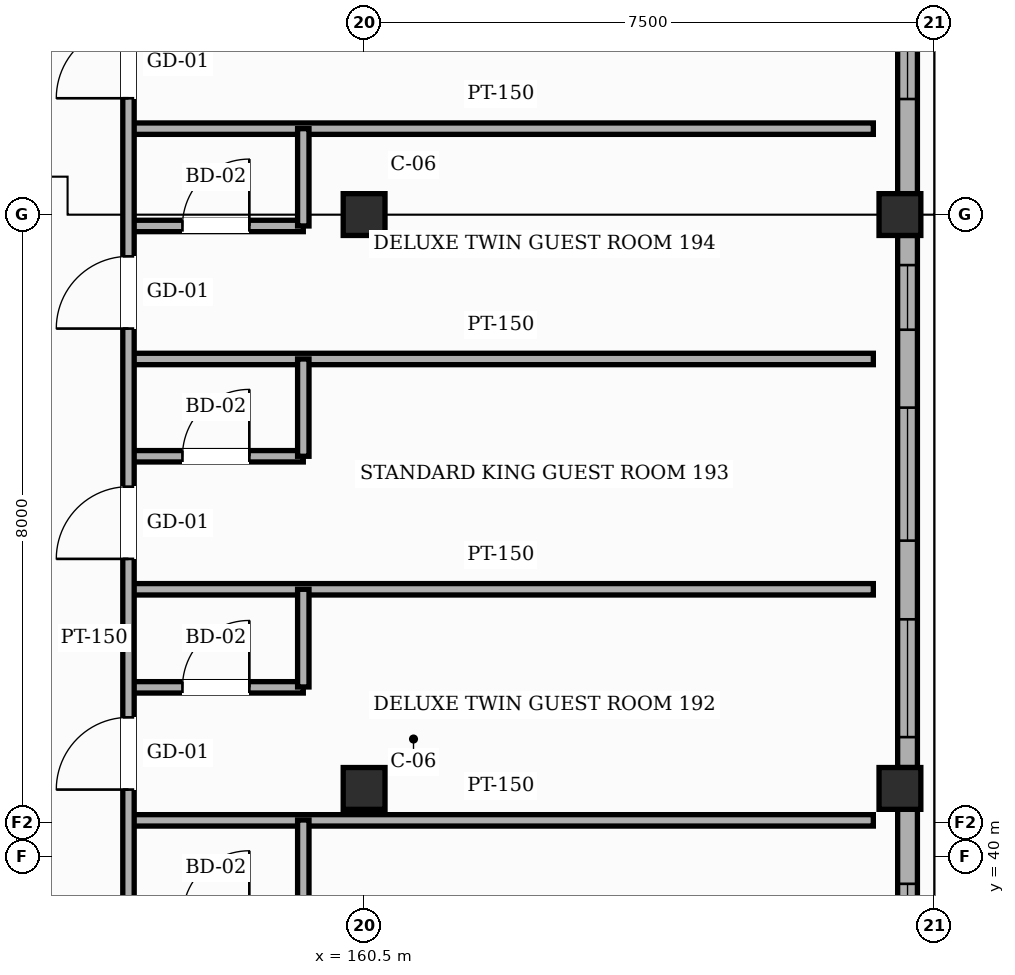
"""IFC4 building model, lengths in metres.
Left out: names, types, materials, properties, quantities, classifications, styles, units other than length and angle.
Written with IfcOpenShell. Run it as: python <this file> out.ifc"""

import sys

from ifc_helpers import new_model, si_unit, direction, frame, frame_2d, origin, origin_2d, place, context, subcontext, project, spatial, rectangle, hollow_rectangle, extrude, element, fill, save


model = new_model("IFC4")
c1 = context("Model", 3, precision=1e-05, world=origin(), true_north=direction((0.0, 1.0)))
c2 = subcontext(c1, "Body", "Model", "MODEL_VIEW")
j1 = project(units=[si_unit("LENGTHUNIT", "METRE"), si_unit("PLANEANGLEUNIT", "RADIAN")], contexts=[c1])
p1 = place(None, origin())
s1 = spatial("IfcSite", under=j1, at=p1, CompositionType="ELEMENT")
p2 = place(p1, origin())
s2 = spatial("IfcBuilding", under=s1, at=p2, CompositionType="ELEMENT")
p3 = place(p2, frame((0.0, 0.0, 31.8)))
s3 = spatial("IfcBuildingStorey", under=s2, at=p3, CompositionType="ELEMENT", Elevation=31.8)
for number, where, z_axis, x_axis in (
    (1, (160.5, 40.9, 0.0), (0.0, 0.0, 1.0), (1.0, 0.0, 0.0)),
    (2, (160.5, 48.45, 0.0), (0.0, 0.0, 1.0), (1.0, 0.0, 0.0)),
    (3, (167.55, 40.9, 0.0), (0.0, 0.0, 1.0), (1.0, 0.0, 0.0)),
    (4, (167.55, 48.45, 0.0), (0.0, 0.0, 1.0), (1.0, 0.0, 0.0)),
):
    element("IfcColumn", number, at=place(p3, frame(where, z_axis=z_axis, x_axis=x_axis)), inside=s3, PredefinedType="COLUMN", context=c2, shape_type="SweptSolid", body=[
        extrude(hollow_rectangle(XDim=0.55, YDim=0.55, WallThickness=0.022, InnerFilletRadius=0.022, OuterFilletRadius=0.044, at=origin_2d()), origin(), (0.0, 0.0, 1.0), 3.6),
    ])
p4 = place(p3, frame((167.65, 40.625, 0.0), z_axis=(0.0, 0.0, 1.0), x_axis=(0.0, -1.0, 0.0)))
e5 = element("IfcWall", 5, at=p4, inside=s3, PredefinedType="SOLIDWALL", context=c2, shape_type="SweptSolid", body=[
    extrude(rectangle(XDim=8.35, YDim=0.26, at=frame_2d((4.175, 0.0))), origin(), (0.0, 0.0, 1.0), 2.755),
])
p5 = place(p4, frame((6.85, 0.0, 0.85)))
e6 = element("IfcOpeningElement", 6, at=p5, cuts=e5, PredefinedType="OPENING", context=c2, shape_type="SweptSolid", body=[
    extrude(rectangle(XDim=0.85, YDim=1.35, at=frame_2d((0.425, 0.675))), frame((0.0, 0.14, 0.0), z_axis=(0.0, -1.0, 0.0), x_axis=(1.0, 0.0, 0.0)), (0.0, 0.0, 1.0), 0.28),
])
p6 = place(p4, frame((4.11, 0.0, 0.85)))
e7 = element("IfcOpeningElement", 7, at=p6, cuts=e5, PredefinedType="OPENING", context=c2, shape_type="SweptSolid", body=[
    extrude(rectangle(XDim=1.15, YDim=1.65, at=frame_2d((0.575, 0.825))), frame((0.0, 0.14, 0.0), z_axis=(0.0, -1.0, 0.0), x_axis=(1.0, 0.0, 0.0)), (0.0, 0.0, 1.0), 0.28),
])
p7 = place(p4, frame((0.98, 0.0, 0.85)))
e8 = element("IfcOpeningElement", 8, at=p7, cuts=e5, PredefinedType="OPENING", context=c2, shape_type="SweptSolid", body=[
    extrude(rectangle(XDim=1.35, YDim=1.65, at=frame_2d((0.675, 0.825))), frame((0.0, 0.14, 0.0), z_axis=(0.0, -1.0, 0.0), x_axis=(1.0, 0.0, 0.0)), (0.0, 0.0, 1.0), 0.28),
])
p8 = place(p3, frame((167.65, 48.175, 0.0), z_axis=(0.0, 0.0, 1.0), x_axis=(0.0, -1.0, 0.0)))
e9 = element("IfcWall", 9, at=p8, inside=s3, PredefinedType="SOLIDWALL", context=c2, shape_type="SweptSolid", body=[
    extrude(rectangle(XDim=7.0, YDim=0.26, at=frame_2d((3.5, 0.0))), origin(), (0.0, 0.0, 1.0), 2.755),
])
p9 = place(p8, frame((5.05, 0.0, 0.85)))
e10 = element("IfcOpeningElement", 10, at=p9, cuts=e9, PredefinedType="OPENING", context=c2, shape_type="SweptSolid", body=[
    extrude(rectangle(XDim=1.55, YDim=1.65, at=frame_2d((0.775, 0.825))), frame((0.0, 0.14, 0.0), z_axis=(0.0, -1.0, 0.0), x_axis=(1.0, 0.0, 0.0)), (0.0, 0.0, 1.0), 0.28),
])
p10 = place(p8, frame((2.265, 0.0, 0.85)))
e11 = element("IfcOpeningElement", 11, at=p10, cuts=e9, PredefinedType="OPENING", context=c2, shape_type="SweptSolid", body=[
    extrude(rectangle(XDim=1.75, YDim=1.65, at=frame_2d((0.875, 0.825))), frame((0.0, 0.14, 0.0), z_axis=(0.0, -1.0, 0.0), x_axis=(1.0, 0.0, 0.0)), (0.0, 0.0, 1.0), 0.28),
])
p11 = place(p8, frame((0.39, 0.0, 0.85)))
e12 = element("IfcOpeningElement", 12, at=p11, cuts=e9, PredefinedType="OPENING", context=c2, shape_type="SweptSolid", body=[
    extrude(rectangle(XDim=0.85, YDim=1.35, at=frame_2d((0.425, 0.675))), frame((0.0, 0.14, 0.0), z_axis=(0.0, -1.0, 0.0), x_axis=(1.0, 0.0, 0.0)), (0.0, 0.0, 1.0), 0.28),
])
p12 = place(p3, frame((167.65, 56.175, 0.0), z_axis=(0.0, 0.0, 1.0), x_axis=(0.0, -1.0, 0.0)))
e13 = element("IfcWall", 13, at=p12, inside=s3, PredefinedType="SOLIDWALL", context=c2, shape_type="SweptSolid", body=[
    extrude(rectangle(XDim=7.45, YDim=0.26, at=frame_2d((3.725, 0.0))), origin(), (0.0, 0.0, 1.0), 2.755),
])
p13 = place(p12, frame((3.955, 0.0, 0.85)))
e14 = element("IfcOpeningElement", 14, at=p13, cuts=e13, PredefinedType="OPENING", context=c2, shape_type="SweptSolid", body=[
    extrude(rectangle(XDim=2.25, YDim=1.65, at=frame_2d((1.125, 0.825))), frame((0.0, 0.14, 0.0), z_axis=(0.0, -1.0, 0.0), x_axis=(1.0, 0.0, 0.0)), (0.0, 0.0, 1.0), 0.28),
])
p14 = place(p12, frame((1.37, 0.0, 0.85)))
e15 = element("IfcOpeningElement", 15, at=p14, cuts=e13, PredefinedType="OPENING", context=c2, shape_type="SweptSolid", body=[
    extrude(rectangle(XDim=1.35, YDim=1.35, at=frame_2d((0.675, 0.675))), frame((0.0, 0.14, 0.0), z_axis=(0.0, -1.0, 0.0), x_axis=(1.0, 0.0, 0.0)), (0.0, 0.0, 1.0), 0.28),
])
p15 = place(p3, frame((157.4, 40.48, 0.0), z_axis=(0.0, 0.0, 1.0), x_axis=(1.0, 0.0, 0.0)))
e16 = element("IfcWall", 16, at=p15, inside=s3, PredefinedType="PARTITIONING", context=c2, shape_type="SweptSolid", body=[
    extrude(rectangle(XDim=9.8, YDim=0.15, at=frame_2d((4.9, 0.0))), origin(), (0.0, 0.0, 1.0), 3.365),
])
p16 = place(p3, frame((157.4, 42.23, 0.0), z_axis=(0.0, 0.0, 1.0), x_axis=(1.0, 0.0, 0.0)))
e17 = element("IfcWall", 17, at=p16, inside=s3, PredefinedType="PARTITIONING", context=c2, shape_type="SweptSolid", body=[
    extrude(rectangle(XDim=2.3, YDim=0.15, at=frame_2d((1.15, 0.0))), origin(), (0.0, 0.0, 1.0), 3.365),
])
p17 = place(p16, frame((0.71, 0.0, 0.0)))
e18 = element("IfcOpeningElement", 18, at=p17, cuts=e17, PredefinedType="OPENING", context=c2, shape_type="SweptSolid", body=[
    extrude(rectangle(XDim=0.88, YDim=2.12, at=frame_2d((0.44, 1.06))), frame((0.0, 0.085, 0.0), z_axis=(0.0, -1.0, 0.0), x_axis=(1.0, 0.0, 0.0)), (0.0, 0.0, 1.0), 0.17),
])
p18 = place(p3, frame((157.4, 43.52, 0.0), z_axis=(0.0, 0.0, 1.0), x_axis=(1.0, 0.0, 0.0)))
e19 = element("IfcWall", 19, at=p18, inside=s3, PredefinedType="PARTITIONING", context=c2, shape_type="SweptSolid", body=[
    extrude(rectangle(XDim=9.8, YDim=0.15, at=frame_2d((4.9, 0.0))), origin(), (0.0, 0.0, 1.0), 3.365),
])
p19 = place(p3, frame((157.4, 45.27, 0.0), z_axis=(0.0, 0.0, 1.0), x_axis=(1.0, 0.0, 0.0)))
e20 = element("IfcWall", 20, at=p19, inside=s3, PredefinedType="PARTITIONING", context=c2, shape_type="SweptSolid", body=[
    extrude(rectangle(XDim=2.3, YDim=0.15, at=frame_2d((1.15, 0.0))), origin(), (0.0, 0.0, 1.0), 3.365),
])
p20 = place(p19, frame((0.71, 0.0, 0.0)))
e21 = element("IfcOpeningElement", 21, at=p20, cuts=e20, PredefinedType="OPENING", context=c2, shape_type="SweptSolid", body=[
    extrude(rectangle(XDim=0.88, YDim=2.12, at=frame_2d((0.44, 1.06))), frame((0.0, 0.085, 0.0), z_axis=(0.0, -1.0, 0.0), x_axis=(1.0, 0.0, 0.0)), (0.0, 0.0, 1.0), 0.17),
])
p21 = place(p3, frame((157.4, 46.55, 0.0), z_axis=(0.0, 0.0, 1.0), x_axis=(1.0, 0.0, 0.0)))
e22 = element("IfcWall", 22, at=p21, inside=s3, PredefinedType="PARTITIONING", context=c2, shape_type="SweptSolid", body=[
    extrude(rectangle(XDim=9.8, YDim=0.15, at=frame_2d((4.9, 0.0))), origin(), (0.0, 0.0, 1.0), 3.365),
])
p22 = place(p3, frame((157.4, 48.3, 0.0), z_axis=(0.0, 0.0, 1.0), x_axis=(1.0, 0.0, 0.0)))
e23 = element("IfcWall", 23, at=p22, inside=s3, PredefinedType="PARTITIONING", context=c2, shape_type="SweptSolid", body=[
    extrude(rectangle(XDim=2.3, YDim=0.15, at=frame_2d((1.15, 0.0))), origin(), (0.0, 0.0, 1.0), 3.365),
])
p23 = place(p22, frame((0.71, 0.0, 0.0)))
e24 = element("IfcOpeningElement", 24, at=p23, cuts=e23, PredefinedType="OPENING", context=c2, shape_type="SweptSolid", body=[
    extrude(rectangle(XDim=0.88, YDim=2.12, at=frame_2d((0.44, 1.06))), frame((0.0, 0.085, 0.0), z_axis=(0.0, -1.0, 0.0), x_axis=(1.0, 0.0, 0.0)), (0.0, 0.0, 1.0), 0.17),
])
p24 = place(p3, frame((157.4, 49.58, 0.0), z_axis=(0.0, 0.0, 1.0), x_axis=(1.0, 0.0, 0.0)))
e25 = element("IfcWall", 25, at=p24, inside=s3, PredefinedType="PARTITIONING", context=c2, shape_type="SweptSolid", body=[
    extrude(rectangle(XDim=9.8, YDim=0.15, at=frame_2d((4.9, 0.0))), origin(), (0.0, 0.0, 1.0), 3.365),
])
p25 = place(p3, frame((157.4, 22.3, 0.0), z_axis=(0.0, 0.0, 1.0), x_axis=(0.0, 1.0, 0.0)))
e26 = element("IfcWall", 26, at=p25, inside=s3, PredefinedType="PARTITIONING", context=c2, shape_type="SweptSolid", body=[
    extrude(rectangle(XDim=48.5, YDim=0.15, at=frame_2d((24.25, 0.0))), origin(), (0.0, 0.0, 1.0), 3.365),
])
p26 = place(p25, frame((0.4, 0.0, 0.0)))
e27 = element("IfcOpeningElement", 27, at=p26, cuts=e26, PredefinedType="OPENING", context=c2, shape_type="SweptSolid", body=[
    extrude(rectangle(XDim=0.95, YDim=2.15, at=frame_2d((0.475, 1.075))), frame((0.0, 0.085, 0.0), z_axis=(0.0, -1.0, 0.0), x_axis=(1.0, 0.0, 0.0)), (0.0, 0.0, 1.0), 0.17),
])
p27 = place(p25, frame((3.43, 0.0, 0.0)))
e28 = element("IfcOpeningElement", 28, at=p27, cuts=e26, PredefinedType="OPENING", context=c2, shape_type="SweptSolid", body=[
    extrude(rectangle(XDim=0.95, YDim=2.15, at=frame_2d((0.475, 1.075))), frame((0.0, 0.085, 0.0), z_axis=(0.0, -1.0, 0.0), x_axis=(1.0, 0.0, 0.0)), (0.0, 0.0, 1.0), 0.17),
])
p28 = place(p25, frame((6.46, 0.0, 0.0)))
e29 = element("IfcOpeningElement", 29, at=p28, cuts=e26, PredefinedType="OPENING", context=c2, shape_type="SweptSolid", body=[
    extrude(rectangle(XDim=0.95, YDim=2.15, at=frame_2d((0.475, 1.075))), frame((0.0, 0.085, 0.0), z_axis=(0.0, -1.0, 0.0), x_axis=(1.0, 0.0, 0.0)), (0.0, 0.0, 1.0), 0.17),
])
p29 = place(p25, frame((9.495, 0.0, 0.0)))
e30 = element("IfcOpeningElement", 30, at=p29, cuts=e26, PredefinedType="OPENING", context=c2, shape_type="SweptSolid", body=[
    extrude(rectangle(XDim=0.95, YDim=2.15, at=frame_2d((0.475, 1.075))), frame((0.0, 0.085, 0.0), z_axis=(0.0, -1.0, 0.0), x_axis=(1.0, 0.0, 0.0)), (0.0, 0.0, 1.0), 0.17),
])
p30 = place(p25, frame((12.525, 0.0, 0.0)))
e31 = element("IfcOpeningElement", 31, at=p30, cuts=e26, PredefinedType="OPENING", context=c2, shape_type="SweptSolid", body=[
    extrude(rectangle(XDim=0.95, YDim=2.15, at=frame_2d((0.475, 1.075))), frame((0.0, 0.085, 0.0), z_axis=(0.0, -1.0, 0.0), x_axis=(1.0, 0.0, 0.0)), (0.0, 0.0, 1.0), 0.17),
])
p31 = place(p25, frame((15.555, 0.0, 0.0)))
e32 = element("IfcOpeningElement", 32, at=p31, cuts=e26, PredefinedType="OPENING", context=c2, shape_type="SweptSolid", body=[
    extrude(rectangle(XDim=0.95, YDim=2.15, at=frame_2d((0.475, 1.075))), frame((0.0, 0.085, 0.0), z_axis=(0.0, -1.0, 0.0), x_axis=(1.0, 0.0, 0.0)), (0.0, 0.0, 1.0), 0.17),
])
p32 = place(p25, frame((18.585, 0.0, 0.0)))
e33 = element("IfcOpeningElement", 33, at=p32, cuts=e26, PredefinedType="OPENING", context=c2, shape_type="SweptSolid", body=[
    extrude(rectangle(XDim=0.95, YDim=2.15, at=frame_2d((0.475, 1.075))), frame((0.0, 0.085, 0.0), z_axis=(0.0, -1.0, 0.0), x_axis=(1.0, 0.0, 0.0)), (0.0, 0.0, 1.0), 0.17),
])
p33 = place(p25, frame((21.62, 0.0, 0.0)))
e34 = element("IfcOpeningElement", 34, at=p33, cuts=e26, PredefinedType="OPENING", context=c2, shape_type="SweptSolid", body=[
    extrude(rectangle(XDim=0.95, YDim=2.15, at=frame_2d((0.475, 1.075))), frame((0.0, 0.085, 0.0), z_axis=(0.0, -1.0, 0.0), x_axis=(1.0, 0.0, 0.0)), (0.0, 0.0, 1.0), 0.17),
])
p34 = place(p25, frame((24.65, 0.0, 0.0)))
e35 = element("IfcOpeningElement", 35, at=p34, cuts=e26, PredefinedType="OPENING", context=c2, shape_type="SweptSolid", body=[
    extrude(rectangle(XDim=0.95, YDim=2.15, at=frame_2d((0.475, 1.075))), frame((0.0, 0.085, 0.0), z_axis=(0.0, -1.0, 0.0), x_axis=(1.0, 0.0, 0.0)), (0.0, 0.0, 1.0), 0.17),
])
p35 = place(p25, frame((27.68, 0.0, 0.0)))
e36 = element("IfcOpeningElement", 36, at=p35, cuts=e26, PredefinedType="OPENING", context=c2, shape_type="SweptSolid", body=[
    extrude(rectangle(XDim=0.95, YDim=2.15, at=frame_2d((0.475, 1.075))), frame((0.0, 0.085, 0.0), z_axis=(0.0, -1.0, 0.0), x_axis=(1.0, 0.0, 0.0)), (0.0, 0.0, 1.0), 0.17),
])
p36 = place(p25, frame((30.71, 0.0, 0.0)))
e37 = element("IfcOpeningElement", 37, at=p36, cuts=e26, PredefinedType="OPENING", context=c2, shape_type="SweptSolid", body=[
    extrude(rectangle(XDim=0.95, YDim=2.15, at=frame_2d((0.475, 1.075))), frame((0.0, 0.085, 0.0), z_axis=(0.0, -1.0, 0.0), x_axis=(1.0, 0.0, 0.0)), (0.0, 0.0, 1.0), 0.17),
])
p37 = place(p25, frame((33.745, 0.0, 0.0)))
e38 = element("IfcOpeningElement", 38, at=p37, cuts=e26, PredefinedType="OPENING", context=c2, shape_type="SweptSolid", body=[
    extrude(rectangle(XDim=0.95, YDim=2.15, at=frame_2d((0.475, 1.075))), frame((0.0, 0.085, 0.0), z_axis=(0.0, -1.0, 0.0), x_axis=(1.0, 0.0, 0.0)), (0.0, 0.0, 1.0), 0.17),
])
p38 = place(p25, frame((36.775, 0.0, 0.0)))
e39 = element("IfcOpeningElement", 39, at=p38, cuts=e26, PredefinedType="OPENING", context=c2, shape_type="SweptSolid", body=[
    extrude(rectangle(XDim=0.95, YDim=2.15, at=frame_2d((0.475, 1.075))), frame((0.0, 0.085, 0.0), z_axis=(0.0, -1.0, 0.0), x_axis=(1.0, 0.0, 0.0)), (0.0, 0.0, 1.0), 0.17),
])
p39 = place(p25, frame((39.805, 0.0, 0.0)))
e40 = element("IfcOpeningElement", 40, at=p39, cuts=e26, PredefinedType="OPENING", context=c2, shape_type="SweptSolid", body=[
    extrude(rectangle(XDim=0.95, YDim=2.15, at=frame_2d((0.475, 1.075))), frame((0.0, 0.085, 0.0), z_axis=(0.0, -1.0, 0.0), x_axis=(1.0, 0.0, 0.0)), (0.0, 0.0, 1.0), 0.17),
])
p40 = place(p25, frame((42.84, 0.0, 0.0)))
e41 = element("IfcOpeningElement", 41, at=p40, cuts=e26, PredefinedType="OPENING", context=c2, shape_type="SweptSolid", body=[
    extrude(rectangle(XDim=0.95, YDim=2.15, at=frame_2d((0.475, 1.075))), frame((0.0, 0.085, 0.0), z_axis=(0.0, -1.0, 0.0), x_axis=(1.0, 0.0, 0.0)), (0.0, 0.0, 1.0), 0.17),
])
p41 = place(p25, frame((45.87, 0.0, 0.0)))
e42 = element("IfcOpeningElement", 42, at=p41, cuts=e26, PredefinedType="OPENING", context=c2, shape_type="SweptSolid", body=[
    extrude(rectangle(XDim=0.95, YDim=2.15, at=frame_2d((0.475, 1.075))), frame((0.0, 0.085, 0.0), z_axis=(0.0, -1.0, 0.0), x_axis=(1.0, 0.0, 0.0)), (0.0, 0.0, 1.0), 0.17),
])
p42 = place(p3, frame((159.7, 39.205, 0.0), z_axis=(0.0, 0.0, 1.0), x_axis=(0.0, 1.0, 0.0)))
e43 = element("IfcWall", 43, at=p42, inside=s3, PredefinedType="PARTITIONING", context=c2, shape_type="SweptSolid", body=[
    extrude(rectangle(XDim=1.28, YDim=0.15, at=frame_2d((0.64, 0.0))), origin(), (0.0, 0.0, 1.0), 3.365),
])
p43 = place(p3, frame((159.7, 42.235, 0.0), z_axis=(0.0, 0.0, 1.0), x_axis=(0.0, 1.0, 0.0)))
e44 = element("IfcWall", 44, at=p43, inside=s3, PredefinedType="PARTITIONING", context=c2, shape_type="SweptSolid", body=[
    extrude(rectangle(XDim=1.285, YDim=0.15, at=frame_2d((0.643, 0.0))), origin(), (0.0, 0.0, 1.0), 3.365),
])
for number, where, z_axis, x_axis in (
    (45, (159.7, 45.27, 0.0), (0.0, 0.0, 1.0), (0.0, 1.0, 0.0)),
    (46, (159.7, 48.3, 0.0), (0.0, 0.0, 1.0), (0.0, 1.0, 0.0)),
):
    element("IfcWall", number, at=place(p3, frame(where, z_axis=z_axis, x_axis=x_axis)), inside=s3, PredefinedType="PARTITIONING", context=c2, shape_type="SweptSolid", body=[
        extrude(rectangle(XDim=1.28, YDim=0.15, at=frame_2d((0.64, 0.0))), origin(), (0.0, 0.0, 1.0), 3.365),
    ])
p44 = place(p7, origin())
e47 = element("IfcWindow", 47, at=p44, inside=s3, PartitioningType="SINGLE_PANEL", PredefinedType="WINDOW", context=c2, shape_type="SweptSolid", body=[
    extrude(rectangle(XDim=1.35, YDim=1.65, at=frame_2d((0.675, 0.825))), frame((0.0, 0.03, 0.0), z_axis=(0.0, -1.0, 0.0), x_axis=(1.0, 0.0, 0.0)), (0.0, 0.0, 1.0), 0.06),
])
fill(e8, e47)
p45 = place(p9, origin())
e48 = element("IfcWindow", 48, at=p45, inside=s3, PartitioningType="SINGLE_PANEL", PredefinedType="WINDOW", context=c2, shape_type="SweptSolid", body=[
    extrude(rectangle(XDim=1.55, YDim=1.65, at=frame_2d((0.775, 0.825))), frame((0.0, 0.03, 0.0), z_axis=(0.0, -1.0, 0.0), x_axis=(1.0, 0.0, 0.0)), (0.0, 0.0, 1.0), 0.06),
])
fill(e10, e48)
p46 = place(p10, origin())
e49 = element("IfcWindow", 49, at=p46, inside=s3, PartitioningType="SINGLE_PANEL", PredefinedType="WINDOW", context=c2, shape_type="SweptSolid", body=[
    extrude(rectangle(XDim=1.75, YDim=1.65, at=frame_2d((0.875, 0.825))), frame((0.0, 0.03, 0.0), z_axis=(0.0, -1.0, 0.0), x_axis=(1.0, 0.0, 0.0)), (0.0, 0.0, 1.0), 0.06),
])
fill(e11, e49)
p47 = place(p11, origin())
e50 = element("IfcWindow", 50, at=p47, inside=s3, PartitioningType="SINGLE_PANEL", PredefinedType="WINDOW", context=c2, shape_type="SweptSolid", body=[
    extrude(rectangle(XDim=0.85, YDim=1.35, at=frame_2d((0.425, 0.675))), frame((0.0, 0.03, 0.0), z_axis=(0.0, -1.0, 0.0), x_axis=(1.0, 0.0, 0.0)), (0.0, 0.0, 1.0), 0.06),
])
fill(e12, e50)
p48 = place(p13, origin())
e51 = element("IfcWindow", 51, at=p48, inside=s3, PartitioningType="SINGLE_PANEL", PredefinedType="WINDOW", context=c2, shape_type="SweptSolid", body=[
    extrude(rectangle(XDim=2.25, YDim=1.65, at=frame_2d((1.125, 0.825))), frame((0.0, 0.03, 0.0), z_axis=(0.0, -1.0, 0.0), x_axis=(1.0, 0.0, 0.0)), (0.0, 0.0, 1.0), 0.06),
])
fill(e14, e51)
p49 = place(p32, origin())
e52 = element("IfcDoor", 52, at=p49, inside=s3, OperationType="SINGLE_SWING_LEFT", PredefinedType="DOOR", context=c2, shape_type="SweptSolid", body=[
    extrude(rectangle(XDim=0.95, YDim=2.15, at=frame_2d((0.475, 1.075))), frame((0.0, 0.025, 0.0), z_axis=(0.0, -1.0, 0.0), x_axis=(1.0, 0.0, 0.0)), (0.0, 0.0, 1.0), 0.05),
])
fill(e33, e52)
p50 = place(p17, origin())
e53 = element("IfcDoor", 53, at=p50, inside=s3, OperationType="SINGLE_SWING_RIGHT", PredefinedType="DOOR", context=c2, shape_type="SweptSolid", body=[
    extrude(rectangle(XDim=0.88, YDim=2.12, at=frame_2d((0.44, 1.06))), frame((0.0, 0.025, 0.0), z_axis=(0.0, -1.0, 0.0), x_axis=(1.0, 0.0, 0.0)), (0.0, 0.0, 1.0), 0.05),
])
fill(e18, e53)
p51 = place(p33, origin())
e54 = element("IfcDoor", 54, at=p51, inside=s3, OperationType="SINGLE_SWING_LEFT", PredefinedType="DOOR", context=c2, shape_type="SweptSolid", body=[
    extrude(rectangle(XDim=0.95, YDim=2.15, at=frame_2d((0.475, 1.075))), frame((0.0, 0.025, 0.0), z_axis=(0.0, -1.0, 0.0), x_axis=(1.0, 0.0, 0.0)), (0.0, 0.0, 1.0), 0.05),
])
fill(e34, e54)
p52 = place(p20, origin())
e55 = element("IfcDoor", 55, at=p52, inside=s3, OperationType="SINGLE_SWING_RIGHT", PredefinedType="DOOR", context=c2, shape_type="SweptSolid", body=[
    extrude(rectangle(XDim=0.88, YDim=2.12, at=frame_2d((0.44, 1.06))), frame((0.0, 0.025, 0.0), z_axis=(0.0, -1.0, 0.0), x_axis=(1.0, 0.0, 0.0)), (0.0, 0.0, 1.0), 0.05),
])
fill(e21, e55)
p53 = place(p34, origin())
e56 = element("IfcDoor", 56, at=p53, inside=s3, OperationType="SINGLE_SWING_LEFT", PredefinedType="DOOR", context=c2, shape_type="SweptSolid", body=[
    extrude(rectangle(XDim=0.95, YDim=2.15, at=frame_2d((0.475, 1.075))), frame((0.0, 0.025, 0.0), z_axis=(0.0, -1.0, 0.0), x_axis=(1.0, 0.0, 0.0)), (0.0, 0.0, 1.0), 0.05),
])
fill(e35, e56)
p54 = place(p23, origin())
e57 = element("IfcDoor", 57, at=p54, inside=s3, OperationType="SINGLE_SWING_RIGHT", PredefinedType="DOOR", context=c2, shape_type="SweptSolid", body=[
    extrude(rectangle(XDim=0.88, YDim=2.12, at=frame_2d((0.44, 1.06))), frame((0.0, 0.025, 0.0), z_axis=(0.0, -1.0, 0.0), x_axis=(1.0, 0.0, 0.0)), (0.0, 0.0, 1.0), 0.05),
])
fill(e24, e57)
p55 = place(p35, origin())
e58 = element("IfcDoor", 58, at=p55, inside=s3, OperationType="SINGLE_SWING_LEFT", PredefinedType="DOOR", context=c2, shape_type="SweptSolid", body=[
    extrude(rectangle(XDim=0.95, YDim=2.15, at=frame_2d((0.475, 1.075))), frame((0.0, 0.025, 0.0), z_axis=(0.0, -1.0, 0.0), x_axis=(1.0, 0.0, 0.0)), (0.0, 0.0, 1.0), 0.05),
])
fill(e36, e58)
save(model, sys.argv[1])
